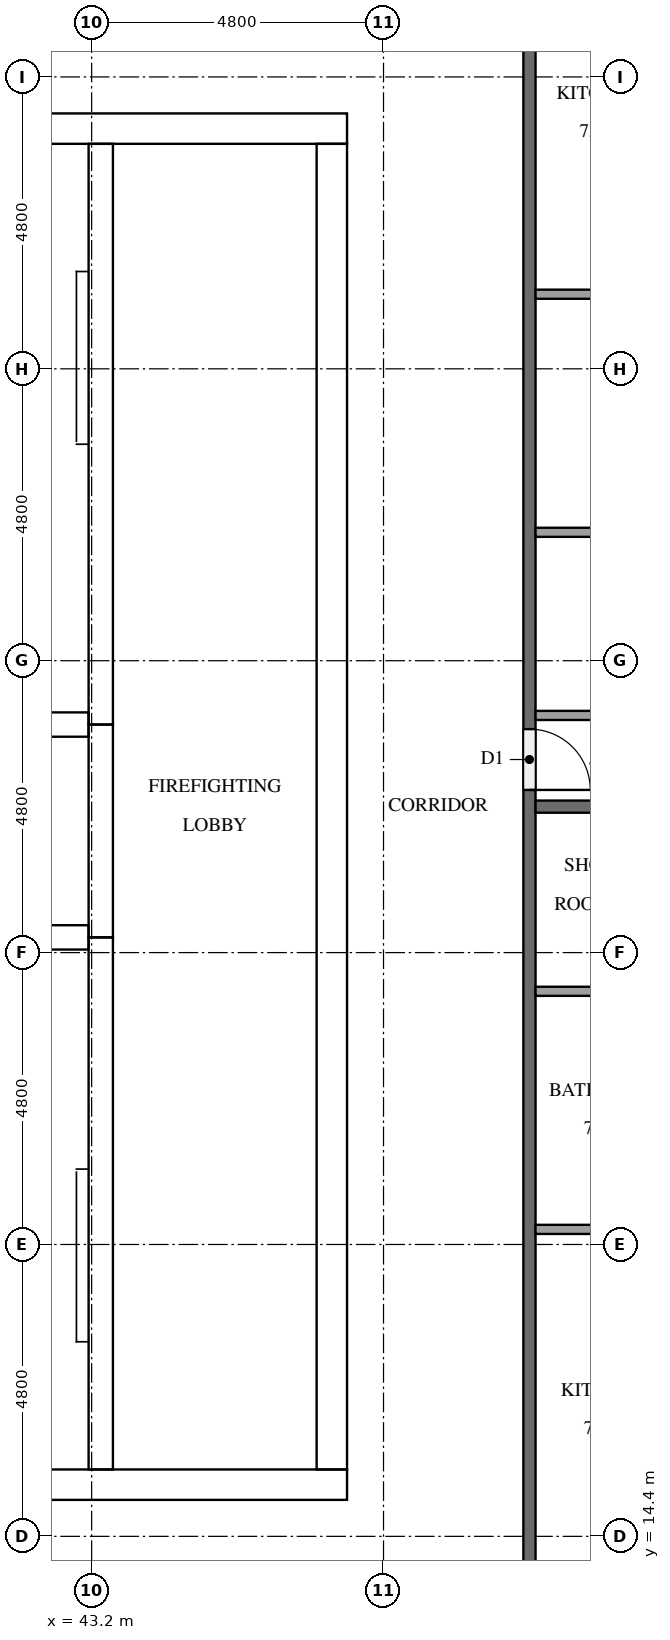
"""IFC4 building model, lengths in metres.
Left out: names, types, materials, properties, quantities, classifications, styles, units other than length and angle.
Written with IfcOpenShell. Run it as: python <this file> out.ifc"""

import sys

from ifc_helpers import new_model, si_unit, direction, frame, frame_2d, origin, place, context, subcontext, project, spatial, rectangle, extrude, element, fill, save


model = new_model("IFC4")
c1 = context("Model", 3, precision=1e-05, world=origin(), true_north=direction((0.0, 1.0)))
c2 = subcontext(c1, "Body", "Model", "MODEL_VIEW")
j1 = project(units=[si_unit("LENGTHUNIT", "METRE"), si_unit("PLANEANGLEUNIT", "RADIAN")], contexts=[c1])
p1 = place(None, origin())
s1 = spatial("IfcSite", under=j1, at=p1, CompositionType="ELEMENT")
p2 = place(p1, origin())
s2 = spatial("IfcBuilding", under=s1, at=p2, CompositionType="ELEMENT")
p3 = place(p2, frame((0.0, 0.0, 279.1)))
s3 = spatial("IfcBuildingStorey", under=s2, at=p3, CompositionType="ELEMENT", Elevation=279.1)
p4 = place(p3, frame((15.0, 15.25, 0.0), z_axis=(0.0, 0.0, 1.0), x_axis=(1.0, 0.0, 0.0)))
e1 = element("IfcWall", 1, at=p4, inside=s3, PredefinedType="SHEAR", context=c2, shape_type="SweptSolid", body=[
    extrude(rectangle(XDim=32.4, YDim=0.5, at=frame_2d((16.2, 0.0))), origin(), (0.0, 0.0, 1.0), 3.2),
])
p5 = place(p4, frame((15.3, 0.0, 0.0)))
e2 = element("IfcOpeningElement", 2, at=p5, cuts=e1, PredefinedType="OPENING", context=c2, shape_type="SweptSolid", body=[
    extrude(rectangle(XDim=1.8, YDim=2.1, at=frame_2d((0.9, 1.05))), frame((0.0, 0.26, 0.0), z_axis=(0.0, -1.0, 0.0), x_axis=(1.0, 0.0, 0.0)), (0.0, 0.0, 1.0), 0.52),
])
p6 = place(p3, frame((15.0, 37.55, 0.0), z_axis=(0.0, 0.0, 1.0), x_axis=(1.0, 0.0, 0.0)))
e3 = element("IfcWall", 3, at=p6, inside=s3, PredefinedType="SHEAR", context=c2, shape_type="SweptSolid", body=[
    extrude(rectangle(XDim=32.4, YDim=0.5, at=frame_2d((16.2, 0.0))), origin(), (0.0, 0.0, 1.0), 3.2),
])
p7 = place(p6, frame((15.3, 0.0, 0.0)))
e4 = element("IfcOpeningElement", 4, at=p7, cuts=e3, PredefinedType="OPENING", context=c2, shape_type="SweptSolid", body=[
    extrude(rectangle(XDim=1.8, YDim=2.1, at=frame_2d((0.9, 1.05))), frame((0.0, 0.26, 0.0), z_axis=(0.0, -1.0, 0.0), x_axis=(1.0, 0.0, 0.0)), (0.0, 0.0, 1.0), 0.52),
])
p8 = place(p6, frame((1.282, 0.0, 0.0)))
e5 = element("IfcOpeningElement", 5, at=p8, cuts=e3, PredefinedType="OPENING", context=c2, shape_type="SweptSolid", body=[
    extrude(rectangle(XDim=1.0, YDim=2.1, at=frame_2d((0.5, 1.05))), frame((0.0, 0.26, 0.0), z_axis=(0.0, -1.0, 0.0), x_axis=(1.0, 0.0, 0.0)), (0.0, 0.0, 1.0), 0.52),
])
p9 = place(p6, frame((5.082, 0.0, 0.0)))
e6 = element("IfcOpeningElement", 6, at=p9, cuts=e3, PredefinedType="OPENING", context=c2, shape_type="SweptSolid", body=[
    extrude(rectangle(XDim=1.0, YDim=2.1, at=frame_2d((0.5, 1.05))), frame((0.0, 0.26, 0.0), z_axis=(0.0, -1.0, 0.0), x_axis=(1.0, 0.0, 0.0)), (0.0, 0.0, 1.0), 0.52),
])
p10 = place(p3, frame((47.15, 15.5, 0.0), z_axis=(0.0, 0.0, 1.0), x_axis=(0.0, 1.0, 0.0)))
e7 = element("IfcWall", 7, at=p10, inside=s3, PredefinedType="SHEAR", context=c2, shape_type="SweptSolid", body=[
    extrude(rectangle(XDim=21.8, YDim=0.5, at=frame_2d((10.9, 0.0))), origin(), (0.0, 0.0, 1.0), 3.2),
])
p11 = place(p10, frame((10.6, 0.0, 0.0)))
e8 = element("IfcOpeningElement", 8, at=p11, cuts=e7, PredefinedType="OPENING", context=c2, shape_type="SweptSolid", body=[
    extrude(rectangle(XDim=1.2, YDim=2.1, at=frame_2d((0.6, 1.05))), frame((0.0, 0.26, 0.0), z_axis=(0.0, -1.0, 0.0), x_axis=(1.0, 0.0, 0.0)), (0.0, 0.0, 1.0), 0.52),
])
p12 = place(p3, frame((43.35, 15.5, 0.0), z_axis=(0.0, 0.0, 1.0), x_axis=(0.0, 1.0, 0.0)))
e9 = element("IfcWall", 9, at=p12, inside=s3, PredefinedType="SHEAR", context=c2, shape_type="SweptSolid", body=[
    extrude(rectangle(XDim=8.75, YDim=0.4, at=frame_2d((4.375, 0.0))), origin(), (0.0, 0.0, 1.0), 3.2),
])
p13 = place(p12, frame((0.7, 0.0, 0.0)))
e10 = element("IfcOpeningElement", 10, at=p13, cuts=e9, PredefinedType="OPENING", context=c2, shape_type="SweptSolid", body=[
    extrude(rectangle(XDim=1.2, YDim=2.1, at=frame_2d((0.6, 1.05))), frame((0.0, 0.21, 0.0), z_axis=(0.0, -1.0, 0.0), x_axis=(1.0, 0.0, 0.0)), (0.0, 0.0, 1.0), 0.42),
])
p14 = place(p3, frame((43.35, 24.25, 0.0), z_axis=(0.0, 0.0, 1.0), x_axis=(0.0, 1.0, 0.0)))
e11 = element("IfcWall", 11, at=p14, inside=s3, PredefinedType="SHEAR", context=c2, shape_type="SweptSolid", body=[
    extrude(rectangle(XDim=3.5, YDim=0.4, at=frame_2d((1.75, 0.0))), origin(), (0.0, 0.0, 1.0), 3.2),
])
p15 = place(p14, frame((1.2, 0.0, 0.0)))
e12 = element("IfcOpeningElement", 12, at=p15, cuts=e11, PredefinedType="OPENING", context=c2, shape_type="SweptSolid", body=[
    extrude(rectangle(XDim=1.1, YDim=2.1, at=frame_2d((0.55, 1.05))), frame((0.0, 0.21, 0.0), z_axis=(0.0, -1.0, 0.0), x_axis=(1.0, 0.0, 0.0)), (0.0, 0.0, 1.0), 0.42),
])
p16 = place(p3, frame((43.35, 27.75, 0.0), z_axis=(0.0, 0.0, 1.0), x_axis=(0.0, 1.0, 0.0)))
e13 = element("IfcWall", 13, at=p16, inside=s3, PredefinedType="SHEAR", context=c2, shape_type="SweptSolid", body=[
    extrude(rectangle(XDim=9.55, YDim=0.4, at=frame_2d((4.775, 0.0))), origin(), (0.0, 0.0, 1.0), 3.2),
])
p17 = place(p16, frame((7.65, 0.0, 0.0)))
e14 = element("IfcOpeningElement", 14, at=p17, cuts=e13, PredefinedType="OPENING", context=c2, shape_type="SweptSolid", body=[
    extrude(rectangle(XDim=1.2, YDim=2.1, at=frame_2d((0.6, 1.05))), frame((0.0, 0.21, 0.0), z_axis=(0.0, -1.0, 0.0), x_axis=(1.0, 0.0, 0.0)), (0.0, 0.0, 1.0), 0.42),
])
for number, where, z_axis, x_axis in (
    (15, (39.5, 24.25, 0.0), (0.0, 0.0, 1.0), (1.0, 0.0, 0.0)),
    (16, (39.5, 27.75, 0.0), (0.0, 0.0, 1.0), (1.0, 0.0, 0.0)),
):
    element("IfcWall", number, at=place(p3, frame(where, z_axis=z_axis, x_axis=x_axis)), inside=s3, PredefinedType="SHEAR", context=c2, shape_type="SweptSolid", body=[
        extrude(rectangle(XDim=3.65, YDim=0.4, at=frame_2d((1.825, 0.0))), origin(), (0.0, 0.0, 1.0), 3.2),
    ])
p18 = place(p3, frame((50.4, 40.7, 0.0), z_axis=(0.0, 0.0, 1.0), x_axis=(0.0, -1.0, 0.0)))
e17 = element("IfcWall", 17, at=p18, inside=s3, PredefinedType="PARTITIONING", context=c2, shape_type="SweptSolid", body=[
    extrude(rectangle(XDim=28.6, YDim=0.2, at=frame_2d((14.3, 0.0))), origin(), (0.0, 0.0, 1.0), 3.2),
])
p19 = place(p18, frame((27.425, 0.0, 0.0)))
e18 = element("IfcOpeningElement", 18, at=p19, cuts=e17, PredefinedType="OPENING", context=c2, shape_type="SweptSolid", body=[
    extrude(rectangle(XDim=1.0, YDim=2.1, at=frame_2d((0.5, 1.05))), frame((0.0, 0.11, 0.0), z_axis=(0.0, -1.0, 0.0), x_axis=(1.0, 0.0, 0.0)), (0.0, 0.0, 1.0), 0.22),
])
p20 = place(p18, frame((13.025, 0.0, 0.0)))
e19 = element("IfcOpeningElement", 19, at=p20, cuts=e17, PredefinedType="OPENING", context=c2, shape_type="SweptSolid", body=[
    extrude(rectangle(XDim=1.0, YDim=2.1, at=frame_2d((0.5, 1.05))), frame((0.0, 0.11, 0.0), z_axis=(0.0, -1.0, 0.0), x_axis=(1.0, 0.0, 0.0)), (0.0, 0.0, 1.0), 0.22),
])
p21 = place(p3, frame((50.5, 26.4, 0.0), z_axis=(0.0, 0.0, 1.0), x_axis=(1.0, 0.0, 0.0)))
e20 = element("IfcWall", 20, at=p21, inside=s3, PredefinedType="PARTITIONING", context=c2, shape_type="SweptSolid", body=[
    extrude(rectangle(XDim=7.0, YDim=0.2, at=frame_2d((3.5, 0.0))), origin(), (0.0, 0.0, 1.0), 3.2),
])
for number, where, z_axis, x_axis in (
    (21, (50.5, 19.448, 0.0), (0.0, 0.0, 1.0), (1.0, 0.0, 0.0)),
    (22, (50.5, 23.364, 0.0), (0.0, 0.0, 1.0), (1.0, 0.0, 0.0)),
):
    element("IfcWall", number, at=place(p3, frame(where, z_axis=z_axis, x_axis=x_axis)), inside=s3, PredefinedType="PARTITIONING", context=c2, shape_type="SweptSolid", body=[
        extrude(rectangle(XDim=2.225, YDim=0.15, at=frame_2d((1.113, 0.0))), origin(), (0.0, 0.0, 1.0), 3.2),
    ])
for number, where, z_axis, x_axis in (
    (23, (50.5, 30.912, 0.0), (0.0, 0.0, 1.0), (1.0, 0.0, 0.0)),
    (24, (50.5, 34.827, 0.0), (0.0, 0.0, 1.0), (1.0, 0.0, 0.0)),
):
    element("IfcWall", number, at=place(p3, frame(where, z_axis=z_axis, x_axis=x_axis)), inside=s3, PredefinedType="PARTITIONING", context=c2, shape_type="SweptSolid", body=[
        extrude(rectangle(XDim=2.075, YDim=0.15, at=frame_2d((1.038, 0.0))), origin(), (0.0, 0.0, 1.0), 3.2),
    ])
p22 = place(p3, frame((50.5, 27.9, 0.0), z_axis=(0.0, 0.0, 1.0), x_axis=(1.0, 0.0, 0.0)))
e25 = element("IfcWall", 25, at=p22, inside=s3, PredefinedType="PARTITIONING", context=c2, shape_type="SweptSolid", body=[
    extrude(rectangle(XDim=2.225, YDim=0.15, at=frame_2d((1.113, 0.0))), origin(), (0.0, 0.0, 1.0), 3.2),
])
p23 = place(p15, origin())
e26 = element("IfcDoor", 26, at=p23, inside=s3, OperationType="DOUBLE_DOOR_SLIDING", PredefinedType="DOOR", context=c2, shape_type="SweptSolid", body=[
    extrude(rectangle(XDim=1.1, YDim=2.1, at=frame_2d((0.55, 1.05))), frame((0.0, 0.025, 0.0), z_axis=(0.0, -1.0, 0.0), x_axis=(1.0, 0.0, 0.0)), (0.0, 0.0, 1.0), 0.05),
])
fill(e12, e26)
p24 = place(p13, origin())
e27 = element("IfcDoor", 27, at=p24, inside=s3, OperationType="SINGLE_SWING_RIGHT", PredefinedType="DOOR", context=c2, shape_type="SweptSolid", body=[
    extrude(rectangle(XDim=1.2, YDim=2.1, at=frame_2d((0.6, 1.05))), frame((0.0, 0.025, 0.0), z_axis=(0.0, -1.0, 0.0), x_axis=(1.0, 0.0, 0.0)), (0.0, 0.0, 1.0), 0.05),
])
fill(e10, e27)
p25 = place(p17, origin())
e28 = element("IfcDoor", 28, at=p25, inside=s3, OperationType="SINGLE_SWING_LEFT", PredefinedType="DOOR", context=c2, shape_type="SweptSolid", body=[
    extrude(rectangle(XDim=1.2, YDim=2.1, at=frame_2d((0.6, 1.05))), frame((0.0, 0.025, 0.0), z_axis=(0.0, -1.0, 0.0), x_axis=(1.0, 0.0, 0.0)), (0.0, 0.0, 1.0), 0.05),
])
fill(e14, e28)
p26 = place(p11, origin())
e29 = element("IfcDoor", 29, at=p26, inside=s3, OperationType="SINGLE_SWING_LEFT", PredefinedType="DOOR", context=c2, shape_type="SweptSolid", body=[
    extrude(rectangle(XDim=1.2, YDim=2.1, at=frame_2d((0.6, 1.05))), frame((0.0, 0.025, 0.0), z_axis=(0.0, -1.0, 0.0), x_axis=(1.0, 0.0, 0.0)), (0.0, 0.0, 1.0), 0.05),
])
fill(e8, e29)
p27 = place(p20, origin())
e30 = element("IfcDoor", 30, at=p27, inside=s3, OperationType="SINGLE_SWING_RIGHT", PredefinedType="DOOR", context=c2, shape_type="SweptSolid", body=[
    extrude(rectangle(XDim=1.0, YDim=2.1, at=frame_2d((0.5, 1.05))), frame((0.0, 0.025, 0.0), z_axis=(0.0, -1.0, 0.0), x_axis=(1.0, 0.0, 0.0)), (0.0, 0.0, 1.0), 0.05),
])
fill(e19, e30)
save(model, sys.argv[1])
